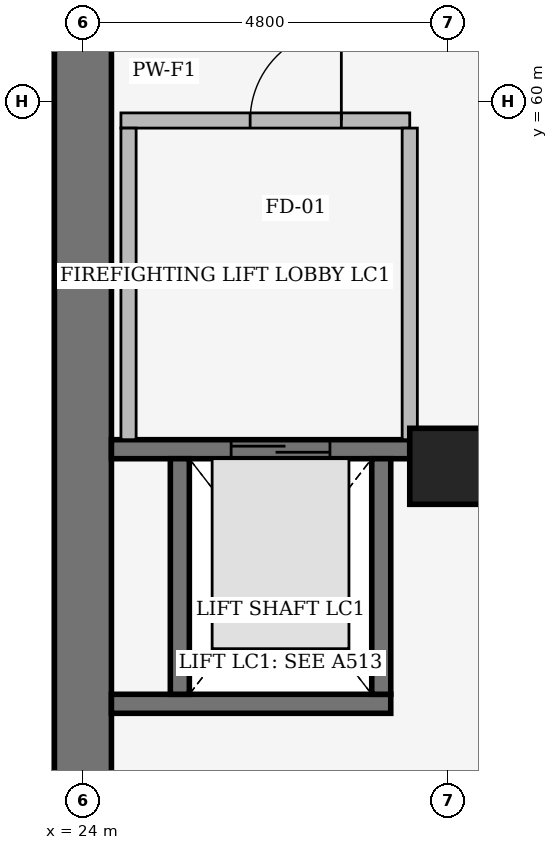
"""IFC4 building model, lengths in metres.
Left out: names, types, materials, properties, quantities, classifications, styles, units other than length and angle.
Written with IfcOpenShell. Run it as: python <this file> out.ifc"""

import sys

from ifc_helpers import new_model, si_unit, direction, frame, frame_2d, origin, origin_2d, place, context, subcontext, project, spatial, rectangle, extrude, element, fill, save


model = new_model("IFC4")
c1 = context("Model", 3, precision=1e-05, world=origin(), true_north=direction((0.0, 1.0)))
c2 = subcontext(c1, "Body", "Model", "MODEL_VIEW")
j1 = project(units=[si_unit("LENGTHUNIT", "METRE"), si_unit("PLANEANGLEUNIT", "RADIAN")], contexts=[c1])
p1 = place(None, origin())
s1 = spatial("IfcSite", under=j1, at=p1, CompositionType="ELEMENT")
p2 = place(p1, origin())
s2 = spatial("IfcBuilding", under=s1, at=p2, CompositionType="ELEMENT")
p3 = place(p2, frame((0.0, 0.0, -4.8)))
s3 = spatial("IfcBuildingStorey", under=s2, at=p3, CompositionType="ELEMENT", Elevation=-4.8)
p4 = place(p3, frame((28.8, 55.2, 0.0), z_axis=(0.0, 0.0, 1.0), x_axis=(1.0, 0.0, 0.0)))
e1 = element("IfcColumn", 1, at=p4, inside=s3, PredefinedType="COLUMN", context=c2, shape_type="SweptSolid", body=[
    extrude(rectangle(XDim=1.0, YDim=1.0, at=origin_2d()), origin(), (0.0, 0.0, 1.0), 4.8),
])
p5 = place(p3, frame((24.0, 50.85, 0.0), z_axis=(0.0, 0.0, 1.0), x_axis=(0.0, 1.0, 0.0)))
e2 = element("IfcWall", 2, at=p5, inside=s3, PredefinedType="SOLIDWALL", context=c2, shape_type="SweptSolid", body=[
    extrude(rectangle(XDim=18.3, YDim=0.75, at=frame_2d((9.15, 0.0))), origin(), (0.0, 0.0, 1.0), 4.4),
])
p6 = place(p3, frame((24.375, 52.075, 0.0), z_axis=(0.0, 0.0, 1.0), x_axis=(1.0, 0.0, 0.0)))
e3 = element("IfcWall", 3, at=p6, inside=s3, PredefinedType="SHEAR", context=c2, shape_type="SweptSolid", body=[
    extrude(rectangle(XDim=3.675, YDim=0.25, at=frame_2d((1.837, 0.0))), origin(), (0.0, 0.0, 1.0), 4.4),
])
p7 = place(p3, frame((24.375, 55.425, 0.0), z_axis=(0.0, 0.0, 1.0), x_axis=(1.0, 0.0, 0.0)))
e4 = element("IfcWall", 4, at=p7, inside=s3, PredefinedType="SHEAR", context=c2, shape_type="SweptSolid", body=[
    extrude(rectangle(XDim=3.925, YDim=0.25, at=frame_2d((1.962, 0.0))), origin(), (0.0, 0.0, 1.0), 4.4),
])
p8 = place(p7, frame((1.575, 0.0, 0.0)))
e5 = element("IfcOpeningElement", 5, at=p8, cuts=e4, PredefinedType="OPENING", context=c2, shape_type="SweptSolid", body=[
    extrude(rectangle(XDim=1.3, YDim=2.2, at=frame_2d((0.65, 1.1))), frame((0.0, 0.135, 0.0), z_axis=(0.0, -1.0, 0.0), x_axis=(1.0, 0.0, 0.0)), (0.0, 0.0, 1.0), 0.27),
])
for number, where, z_axis, x_axis in (
    (6, (25.275, 52.2, 0.0), (0.0, 0.0, 1.0), (0.0, 1.0, 0.0)),
    (7, (27.925, 52.2, 0.0), (0.0, 0.0, 1.0), (0.0, 1.0, 0.0)),
):
    element("IfcWall", number, at=place(p3, frame(where, z_axis=z_axis, x_axis=x_axis)), inside=s3, PredefinedType="SHEAR", context=c2, shape_type="SweptSolid", body=[
        extrude(rectangle(XDim=3.1, YDim=0.25, at=frame_2d((1.55, 0.0))), origin(), (0.0, 0.0, 1.0), 4.4),
    ])
p9 = place(p3, frame((24.5, 59.75, 0.0), z_axis=(0.0, 0.0, 1.0), x_axis=(1.0, 0.0, 0.0)))
e8 = element("IfcWall", 8, at=p9, inside=s3, PredefinedType="PARTITIONING", context=c2, shape_type="SweptSolid", body=[
    extrude(rectangle(XDim=3.8, YDim=0.2, at=frame_2d((1.9, 0.0))), origin(), (0.0, 0.0, 1.0), 3.466),
])
p10 = place(p9, frame((1.7, 0.0, 0.0)))
e9 = element("IfcOpeningElement", 9, at=p10, cuts=e8, PredefinedType="OPENING", context=c2, shape_type="SweptSolid", body=[
    extrude(rectangle(XDim=1.2, YDim=2.2, at=frame_2d((0.6, 1.1))), frame((0.0, 0.11, 0.0), z_axis=(0.0, -1.0, 0.0), x_axis=(1.0, 0.0, 0.0)), (0.0, 0.0, 1.0), 0.22),
])
p11 = place(p3, frame((24.6, 55.55, 0.0), z_axis=(0.0, 0.0, 1.0), x_axis=(0.0, 1.0, 0.0)))
e10 = element("IfcWall", 10, at=p11, inside=s3, PredefinedType="PARTITIONING", context=c2, shape_type="SweptSolid", body=[
    extrude(rectangle(XDim=4.1, YDim=0.2, at=frame_2d((2.05, 0.0))), origin(), (0.0, 0.0, 1.0), 4.44),
])
p12 = place(p3, frame((28.3, 55.55, 0.0), z_axis=(0.0, 0.0, 1.0), x_axis=(0.0, 1.0, 0.0)))
e11 = element("IfcWall", 11, at=p12, inside=s3, PredefinedType="PARTITIONING", context=c2, shape_type="SweptSolid", body=[
    extrude(rectangle(XDim=4.1, YDim=0.2, at=frame_2d((2.05, 0.0))), origin(), (0.0, 0.0, 1.0), 3.466),
])
p13 = place(p8, origin())
e12 = element("IfcDoor", 12, at=p13, inside=s3, OperationType="DOUBLE_DOOR_SLIDING", PredefinedType="DOOR", context=c2, shape_type="SweptSolid", body=[
    extrude(rectangle(XDim=1.3, YDim=2.2, at=frame_2d((0.65, 1.1))), frame((0.0, 0.025, 0.0), z_axis=(0.0, -1.0, 0.0), x_axis=(1.0, 0.0, 0.0)), (0.0, 0.0, 1.0), 0.05),
])
fill(e5, e12)
p14 = place(p10, origin())
e13 = element("IfcDoor", 13, at=p14, inside=s3, OperationType="SINGLE_SWING_RIGHT", PredefinedType="DOOR", context=c2, shape_type="SweptSolid", body=[
    extrude(rectangle(XDim=1.2, YDim=2.2, at=frame_2d((0.6, 1.1))), frame((0.0, 0.025, 0.0), z_axis=(0.0, -1.0, 0.0), x_axis=(1.0, 0.0, 0.0)), (0.0, 0.0, 1.0), 0.05),
])
fill(e9, e13)
save(model, sys.argv[1])
